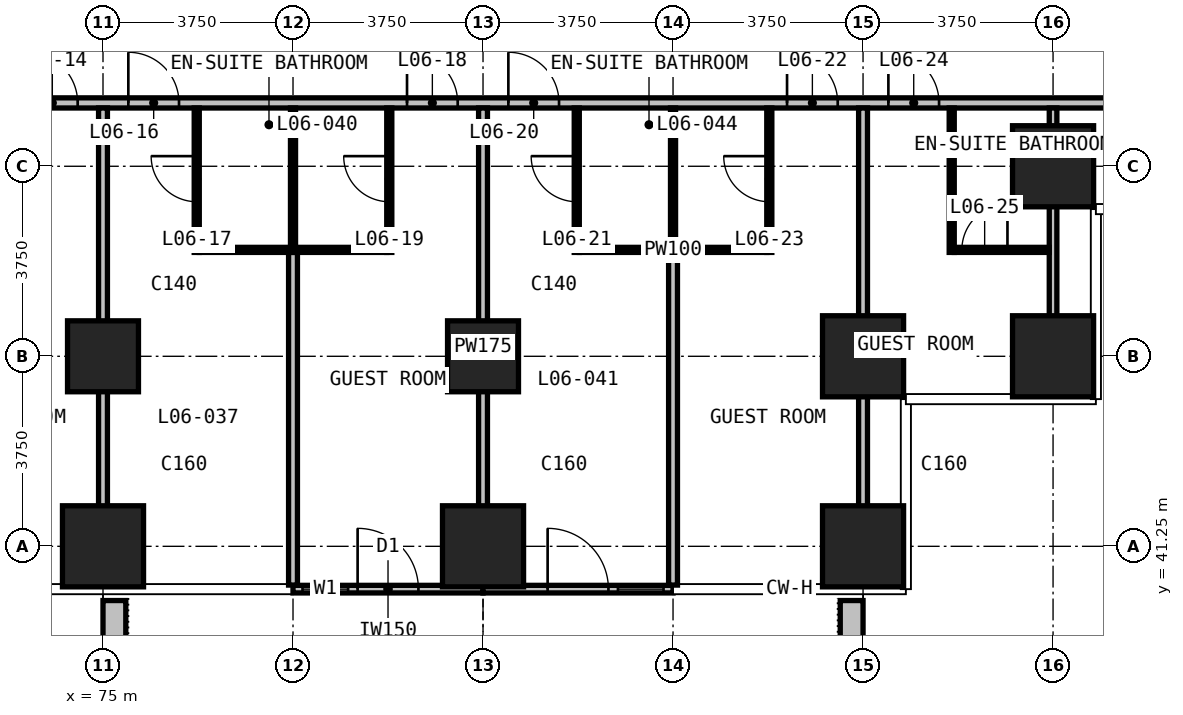
"""IFC4 building model, lengths in metres.
Left out: names, types, materials, properties, quantities, classifications, styles, units other than length and angle.
Written with IfcOpenShell. Run it as: python <this file> out.ifc"""

import sys

from ifc_helpers import new_model, si_unit, direction, frame, frame_2d, origin, origin_2d, place, context, subcontext, project, spatial, rectangle, extrude, element, fill, save


model = new_model("IFC4")
c1 = context("Model", 3, precision=1e-05, world=origin(), true_north=direction((0.0, 1.0)))
c2 = subcontext(c1, "Body", "Model", "MODEL_VIEW")
j1 = project(units=[si_unit("LENGTHUNIT", "METRE"), si_unit("PLANEANGLEUNIT", "RADIAN")], contexts=[c1])
p1 = place(None, origin())
s1 = spatial("IfcSite", under=j1, at=p1, CompositionType="ELEMENT")
p2 = place(p1, origin())
s2 = spatial("IfcBuilding", under=s1, at=p2, CompositionType="ELEMENT")
p3 = place(p2, frame((0.0, 0.0, 39.5)))
s3 = spatial("IfcBuildingStorey", under=s2, at=p3, CompositionType="ELEMENT", Elevation=39.5)
p4 = place(p3, frame((75.0, 41.25, 0.0), z_axis=(0.0, 0.0, 1.0), x_axis=(1.0, 0.0, 0.0)))
e1 = element("IfcColumn", 1, at=p4, inside=s3, PredefinedType="COLUMN", context=c2, shape_type="SweptSolid", body=[
    extrude(rectangle(XDim=1.6, YDim=1.6, at=origin_2d()), origin(), (0.0, 0.0, 1.0), 3.3),
])
p5 = place(p3, frame((75.0, 45.0, 0.0), z_axis=(0.0, 0.0, 1.0), x_axis=(1.0, 0.0, 0.0)))
e2 = element("IfcColumn", 2, at=p5, inside=s3, PredefinedType="COLUMN", context=c2, shape_type="SweptSolid", body=[
    extrude(rectangle(XDim=1.4, YDim=1.4, at=origin_2d()), origin(), (0.0, 0.0, 1.0), 3.3),
])
p6 = place(p3, frame((82.5, 41.25, 0.0), z_axis=(0.0, 0.0, 1.0), x_axis=(1.0, 0.0, 0.0)))
e3 = element("IfcColumn", 3, at=p6, inside=s3, PredefinedType="COLUMN", context=c2, shape_type="SweptSolid", body=[
    extrude(rectangle(XDim=1.6, YDim=1.6, at=origin_2d()), origin(), (0.0, 0.0, 1.0), 3.3),
])
p7 = place(p3, frame((82.5, 45.0, 0.0), z_axis=(0.0, 0.0, 1.0), x_axis=(1.0, 0.0, 0.0)))
e4 = element("IfcColumn", 4, at=p7, inside=s3, PredefinedType="COLUMN", context=c2, shape_type="SweptSolid", body=[
    extrude(rectangle(XDim=1.4, YDim=1.4, at=origin_2d()), origin(), (0.0, 0.0, 1.0), 3.3),
])
for number, where, z_axis, x_axis in (
    (5, (90.0, 41.25, 0.0), (0.0, 0.0, 1.0), (1.0, 0.0, 0.0)),
    (6, (90.0, 45.0, 0.0), (0.0, 0.0, 1.0), (1.0, 0.0, 0.0)),
    (7, (93.75, 45.0, 0.0), (0.0, 0.0, 1.0), (1.0, 0.0, 0.0)),
    (8, (93.75, 48.75, 0.0), (0.0, 0.0, 1.0), (1.0, 0.0, 0.0)),
):
    element("IfcColumn", number, at=place(p3, frame(where, z_axis=z_axis, x_axis=x_axis)), inside=s3, PredefinedType="COLUMN", context=c2, shape_type="SweptSolid", body=[
        extrude(rectangle(XDim=1.6, YDim=1.6, at=origin_2d()), origin(), (0.0, 0.0, 1.0), 3.3),
    ])
p8 = place(p3, frame((78.75, 40.405, 0.0), z_axis=(0.0, 0.0, 1.0), x_axis=(1.0, 0.0, 0.0)))
e9 = element("IfcWall", 9, at=p8, inside=s3, PredefinedType="SOLIDWALL", context=c2, shape_type="SweptSolid", body=[
    extrude(rectangle(XDim=3.75, YDim=0.15, at=frame_2d((1.875, 0.0))), origin(), (0.0, 0.0, 1.0), 3.0),
])
p9 = place(p8, frame((0.188, 0.0, 0.1)))
e10 = element("IfcOpeningElement", 10, at=p9, cuts=e9, PredefinedType="OPENING", context=c2, shape_type="SweptSolid", body=[
    extrude(rectangle(XDim=0.9, YDim=2.4, at=frame_2d((0.45, 1.2))), frame((0.0, 0.085, 0.0), z_axis=(0.0, -1.0, 0.0), x_axis=(1.0, 0.0, 0.0)), (0.0, 0.0, 1.0), 0.17),
])
p10 = place(p8, frame((1.275, 0.0, 0.0)))
e11 = element("IfcOpeningElement", 11, at=p10, cuts=e9, PredefinedType="OPENING", context=c2, shape_type="SweptSolid", body=[
    extrude(rectangle(XDim=1.2, YDim=2.4, at=frame_2d((0.6, 1.2))), frame((0.0, 0.085, 0.0), z_axis=(0.0, -1.0, 0.0), x_axis=(1.0, 0.0, 0.0)), (0.0, 0.0, 1.0), 0.17),
])
p11 = place(p3, frame((82.5, 40.405, 0.0), z_axis=(0.0, 0.0, 1.0), x_axis=(1.0, 0.0, 0.0)))
e12 = element("IfcWall", 12, at=p11, inside=s3, PredefinedType="SOLIDWALL", context=c2, shape_type="SweptSolid", body=[
    extrude(rectangle(XDim=3.75, YDim=0.15, at=frame_2d((1.875, 0.0))), origin(), (0.0, 0.0, 1.0), 3.0),
])
p12 = place(p11, frame((1.275, 0.0, 0.0)))
e13 = element("IfcOpeningElement", 13, at=p12, cuts=e12, PredefinedType="OPENING", context=c2, shape_type="SweptSolid", body=[
    extrude(rectangle(XDim=1.2, YDim=2.4, at=frame_2d((0.6, 1.2))), frame((0.0, 0.085, 0.0), z_axis=(0.0, -1.0, 0.0), x_axis=(1.0, 0.0, 0.0)), (0.0, 0.0, 1.0), 0.17),
])
p13 = place(p11, frame((2.663, 0.0, 0.1)))
e14 = element("IfcOpeningElement", 14, at=p13, cuts=e12, PredefinedType="OPENING", context=c2, shape_type="SweptSolid", body=[
    extrude(rectangle(XDim=0.9, YDim=2.4, at=frame_2d((0.45, 1.2))), frame((0.0, 0.085, 0.0), z_axis=(0.0, -1.0, 0.0), x_axis=(1.0, 0.0, 0.0)), (0.0, 0.0, 1.0), 0.17),
])
for number, where, z_axis, x_axis in (
    (15, (75.225, 40.18, 0.0), (0.0, 0.0, 1.0), (0.0, -1.0, 0.0)),
    (16, (89.775, 40.18, 0.0), (0.0, 0.0, 1.0), (0.0, -1.0, 0.0)),
):
    element("IfcWall", number, at=place(p3, frame(where, z_axis=z_axis, x_axis=x_axis)), inside=s3, PredefinedType="USERDEFINED", context=c2, shape_type="SweptSolid", body=[
        extrude(rectangle(XDim=2.33, YDim=0.45, at=frame_2d((1.165, 0.0))), origin(), (0.0, 0.0, 1.0), 1.1),
    ])
p14 = place(p3, frame((52.575, 50.0, 0.0), z_axis=(0.0, 0.0, 1.0), x_axis=(1.0, 0.0, 0.0)))
e17 = element("IfcWall", 17, at=p14, inside=s3, PredefinedType="PARTITIONING", context=c2, shape_type="SweptSolid", body=[
    extrude(rectangle(XDim=44.85, YDim=0.2, at=frame_2d((22.425, 0.0))), origin(), (0.0, 0.0, 1.0), 3.0),
])
p15 = place(p14, frame((5.925, 0.0, 0.0)))
e18 = element("IfcOpeningElement", 18, at=p15, cuts=e17, PredefinedType="OPENING", context=c2, shape_type="SweptSolid", body=[
    extrude(rectangle(XDim=1.0, YDim=2.2, at=frame_2d((0.5, 1.1))), frame((0.0, 0.11, 0.0), z_axis=(0.0, -1.0, 0.0), x_axis=(1.0, 0.0, 0.0)), (0.0, 0.0, 1.0), 0.22),
])
p16 = place(p14, frame((7.925, 0.0, 0.0)))
e19 = element("IfcOpeningElement", 19, at=p16, cuts=e17, PredefinedType="OPENING", context=c2, shape_type="SweptSolid", body=[
    extrude(rectangle(XDim=1.0, YDim=2.2, at=frame_2d((0.5, 1.1))), frame((0.0, 0.11, 0.0), z_axis=(0.0, -1.0, 0.0), x_axis=(1.0, 0.0, 0.0)), (0.0, 0.0, 1.0), 0.22),
])
p17 = place(p14, frame((13.425, 0.0, 0.0)))
e20 = element("IfcOpeningElement", 20, at=p17, cuts=e17, PredefinedType="OPENING", context=c2, shape_type="SweptSolid", body=[
    extrude(rectangle(XDim=1.0, YDim=2.2, at=frame_2d((0.5, 1.1))), frame((0.0, 0.11, 0.0), z_axis=(0.0, -1.0, 0.0), x_axis=(1.0, 0.0, 0.0)), (0.0, 0.0, 1.0), 0.22),
])
p18 = place(p14, frame((15.425, 0.0, 0.0)))
e21 = element("IfcOpeningElement", 21, at=p18, cuts=e17, PredefinedType="OPENING", context=c2, shape_type="SweptSolid", body=[
    extrude(rectangle(XDim=1.0, YDim=2.2, at=frame_2d((0.5, 1.1))), frame((0.0, 0.11, 0.0), z_axis=(0.0, -1.0, 0.0), x_axis=(1.0, 0.0, 0.0)), (0.0, 0.0, 1.0), 0.22),
])
p19 = place(p14, frame((20.925, 0.0, 0.0)))
e22 = element("IfcOpeningElement", 22, at=p19, cuts=e17, PredefinedType="OPENING", context=c2, shape_type="SweptSolid", body=[
    extrude(rectangle(XDim=1.0, YDim=2.2, at=frame_2d((0.5, 1.1))), frame((0.0, 0.11, 0.0), z_axis=(0.0, -1.0, 0.0), x_axis=(1.0, 0.0, 0.0)), (0.0, 0.0, 1.0), 0.22),
])
p20 = place(p14, frame((22.925, 0.0, 0.0)))
e23 = element("IfcOpeningElement", 23, at=p20, cuts=e17, PredefinedType="OPENING", context=c2, shape_type="SweptSolid", body=[
    extrude(rectangle(XDim=1.0, YDim=2.2, at=frame_2d((0.5, 1.1))), frame((0.0, 0.11, 0.0), z_axis=(0.0, -1.0, 0.0), x_axis=(1.0, 0.0, 0.0)), (0.0, 0.0, 1.0), 0.22),
])
p21 = place(p14, frame((28.425, 0.0, 0.0)))
e24 = element("IfcOpeningElement", 24, at=p21, cuts=e17, PredefinedType="OPENING", context=c2, shape_type="SweptSolid", body=[
    extrude(rectangle(XDim=1.0, YDim=2.2, at=frame_2d((0.5, 1.1))), frame((0.0, 0.11, 0.0), z_axis=(0.0, -1.0, 0.0), x_axis=(1.0, 0.0, 0.0)), (0.0, 0.0, 1.0), 0.22),
])
p22 = place(p14, frame((30.425, 0.0, 0.0)))
e25 = element("IfcOpeningElement", 25, at=p22, cuts=e17, PredefinedType="OPENING", context=c2, shape_type="SweptSolid", body=[
    extrude(rectangle(XDim=1.0, YDim=2.2, at=frame_2d((0.5, 1.1))), frame((0.0, 0.11, 0.0), z_axis=(0.0, -1.0, 0.0), x_axis=(1.0, 0.0, 0.0)), (0.0, 0.0, 1.0), 0.22),
])
p23 = place(p14, frame((35.925, 0.0, 0.0)))
e26 = element("IfcOpeningElement", 26, at=p23, cuts=e17, PredefinedType="OPENING", context=c2, shape_type="SweptSolid", body=[
    extrude(rectangle(XDim=1.0, YDim=2.2, at=frame_2d((0.5, 1.1))), frame((0.0, 0.11, 0.0), z_axis=(0.0, -1.0, 0.0), x_axis=(1.0, 0.0, 0.0)), (0.0, 0.0, 1.0), 0.22),
])
p24 = place(p14, frame((37.925, 0.0, 0.0)))
e27 = element("IfcOpeningElement", 27, at=p24, cuts=e17, PredefinedType="OPENING", context=c2, shape_type="SweptSolid", body=[
    extrude(rectangle(XDim=1.0, YDim=2.2, at=frame_2d((0.5, 1.1))), frame((0.0, 0.11, 0.0), z_axis=(0.0, -1.0, 0.0), x_axis=(1.0, 0.0, 0.0)), (0.0, 0.0, 1.0), 0.22),
])
p25 = place(p14, frame((1.4, 0.0, 0.0)))
e28 = element("IfcOpeningElement", 28, at=p25, cuts=e17, PredefinedType="OPENING", context=c2, shape_type="SweptSolid", body=[
    extrude(rectangle(XDim=0.9, YDim=2.2, at=frame_2d((0.45, 1.1))), frame((0.0, 0.11, 0.0), z_axis=(0.0, -1.0, 0.0), x_axis=(1.0, 0.0, 0.0)), (0.0, 0.0, 1.0), 0.22),
])
p26 = place(p14, frame((42.575, 0.0, 0.0)))
e29 = element("IfcOpeningElement", 29, at=p26, cuts=e17, PredefinedType="OPENING", context=c2, shape_type="SweptSolid", body=[
    extrude(rectangle(XDim=0.9, YDim=2.2, at=frame_2d((0.45, 1.1))), frame((0.0, 0.11, 0.0), z_axis=(0.0, -1.0, 0.0), x_axis=(1.0, 0.0, 0.0)), (0.0, 0.0, 1.0), 0.22),
])
p27 = place(p3, frame((75.0, 40.485, 0.0), z_axis=(0.0, 0.0, 1.0), x_axis=(0.0, 1.0, 0.0)))
e30 = element("IfcWall", 30, at=p27, inside=s3, PredefinedType="PARTITIONING", context=c2, shape_type="SweptSolid", body=[
    extrude(rectangle(XDim=9.415, YDim=0.175, at=frame_2d((4.708, 0.0))), origin(), (0.0, 0.0, 1.0), 3.0),
])
p28 = place(p3, frame((78.75, 40.485, 0.0), z_axis=(0.0, 0.0, 1.0), x_axis=(0.0, 1.0, 0.0)))
e31 = element("IfcWall", 31, at=p28, inside=s3, PredefinedType="PARTITIONING", context=c2, shape_type="SweptSolid", body=[
    extrude(rectangle(XDim=6.565, YDim=0.175, at=frame_2d((3.282, 0.0))), origin(), (0.0, 0.0, 1.0), 3.0),
])
p29 = place(p3, frame((82.5, 40.485, 0.0), z_axis=(0.0, 0.0, 1.0), x_axis=(0.0, 1.0, 0.0)))
e32 = element("IfcWall", 32, at=p29, inside=s3, PredefinedType="PARTITIONING", context=c2, shape_type="SweptSolid", body=[
    extrude(rectangle(XDim=9.415, YDim=0.175, at=frame_2d((4.708, 0.0))), origin(), (0.0, 0.0, 1.0), 3.0),
])
p30 = place(p3, frame((86.25, 40.485, 0.0), z_axis=(0.0, 0.0, 1.0), x_axis=(0.0, 1.0, 0.0)))
e33 = element("IfcWall", 33, at=p30, inside=s3, PredefinedType="PARTITIONING", context=c2, shape_type="SweptSolid", body=[
    extrude(rectangle(XDim=6.565, YDim=0.175, at=frame_2d((3.282, 0.0))), origin(), (0.0, 0.0, 1.0), 3.0),
])
p31 = place(p3, frame((90.0, 40.485, 0.0), z_axis=(0.0, 0.0, 1.0), x_axis=(0.0, 1.0, 0.0)))
e34 = element("IfcWall", 34, at=p31, inside=s3, PredefinedType="PARTITIONING", context=c2, shape_type="SweptSolid", body=[
    extrude(rectangle(XDim=9.415, YDim=0.175, at=frame_2d((4.708, 0.0))), origin(), (0.0, 0.0, 1.0), 3.0),
])
p32 = place(p3, frame((93.75, 44.235, 0.0), z_axis=(0.0, 0.0, 1.0), x_axis=(0.0, 1.0, 0.0)))
e35 = element("IfcWall", 35, at=p32, inside=s3, PredefinedType="PARTITIONING", context=c2, shape_type="SweptSolid", body=[
    extrude(rectangle(XDim=5.665, YDim=0.15, at=frame_2d((2.833, 0.0))), origin(), (0.0, 0.0, 1.0), 3.0),
])
for number, where, z_axis, x_axis in (
    (36, (76.9, 47.1, 0.0), (0.0, 0.0, 1.0), (1.0, 0.0, 0.0)),
    (37, (84.4, 47.1, 0.0), (0.0, 0.0, 1.0), (1.0, 0.0, 0.0)),
):
    element("IfcWall", number, at=place(p3, frame(where, z_axis=z_axis, x_axis=x_axis)), inside=s3, PredefinedType="PARTITIONING", context=c2, shape_type="SweptSolid", body=[
        extrude(rectangle(XDim=3.7, YDim=0.1, at=frame_2d((1.85, 0.0))), origin(), (0.0, 0.0, 1.0), 3.0),
    ])
p33 = place(p3, frame((91.8, 47.1, 0.0), z_axis=(0.0, 0.0, 1.0), x_axis=(1.0, 0.0, 0.0)))
e38 = element("IfcWall", 38, at=p33, inside=s3, PredefinedType="PARTITIONING", context=c2, shape_type="SweptSolid", body=[
    extrude(rectangle(XDim=1.875, YDim=0.1, at=frame_2d((0.938, 0.0))), origin(), (0.0, 0.0, 1.0), 3.0),
])
p34 = place(p33, frame((0.15, 0.0, 0.0)))
e39 = element("IfcOpeningElement", 39, at=p34, cuts=e38, PredefinedType="OPENING", context=c2, shape_type="SweptSolid", body=[
    extrude(rectangle(XDim=0.9, YDim=2.2, at=frame_2d((0.45, 1.1))), frame((0.0, 0.06, 0.0), z_axis=(0.0, -1.0, 0.0), x_axis=(1.0, 0.0, 0.0)), (0.0, 0.0, 1.0), 0.12),
])
p35 = place(p3, frame((76.85, 47.05, 0.0), z_axis=(0.0, 0.0, 1.0), x_axis=(0.0, 1.0, 0.0)))
e40 = element("IfcWall", 40, at=p35, inside=s3, PredefinedType="PARTITIONING", context=c2, shape_type="SweptSolid", body=[
    extrude(rectangle(XDim=2.85, YDim=0.1, at=frame_2d((1.425, 0.0))), origin(), (0.0, 0.0, 1.0), 3.0),
])
p36 = place(p35, frame((1.0, 0.0, 0.0)))
e41 = element("IfcOpeningElement", 41, at=p36, cuts=e40, PredefinedType="OPENING", context=c2, shape_type="SweptSolid", body=[
    extrude(rectangle(XDim=0.9, YDim=2.2, at=frame_2d((0.45, 1.1))), frame((0.0, 0.06, 0.0), z_axis=(0.0, -1.0, 0.0), x_axis=(1.0, 0.0, 0.0)), (0.0, 0.0, 1.0), 0.12),
])
p37 = place(p3, frame((78.75, 47.15, 0.0), z_axis=(0.0, 0.0, 1.0), x_axis=(0.0, 1.0, 0.0)))
e42 = element("IfcWall", 42, at=p37, inside=s3, PredefinedType="PARTITIONING", context=c2, shape_type="SweptSolid", body=[
    extrude(rectangle(XDim=2.75, YDim=0.1, at=frame_2d((1.375, 0.0))), origin(), (0.0, 0.0, 1.0), 3.0),
])
p38 = place(p3, frame((80.65, 47.05, 0.0), z_axis=(0.0, 0.0, 1.0), x_axis=(0.0, 1.0, 0.0)))
e43 = element("IfcWall", 43, at=p38, inside=s3, PredefinedType="PARTITIONING", context=c2, shape_type="SweptSolid", body=[
    extrude(rectangle(XDim=2.85, YDim=0.1, at=frame_2d((1.425, 0.0))), origin(), (0.0, 0.0, 1.0), 3.0),
])
p39 = place(p38, frame((1.0, 0.0, 0.0)))
e44 = element("IfcOpeningElement", 44, at=p39, cuts=e43, PredefinedType="OPENING", context=c2, shape_type="SweptSolid", body=[
    extrude(rectangle(XDim=0.9, YDim=2.2, at=frame_2d((0.45, 1.1))), frame((0.0, 0.06, 0.0), z_axis=(0.0, -1.0, 0.0), x_axis=(1.0, 0.0, 0.0)), (0.0, 0.0, 1.0), 0.12),
])
p40 = place(p3, frame((84.35, 47.05, 0.0), z_axis=(0.0, 0.0, 1.0), x_axis=(0.0, 1.0, 0.0)))
e45 = element("IfcWall", 45, at=p40, inside=s3, PredefinedType="PARTITIONING", context=c2, shape_type="SweptSolid", body=[
    extrude(rectangle(XDim=2.85, YDim=0.1, at=frame_2d((1.425, 0.0))), origin(), (0.0, 0.0, 1.0), 3.0),
])
p41 = place(p40, frame((1.0, 0.0, 0.0)))
e46 = element("IfcOpeningElement", 46, at=p41, cuts=e45, PredefinedType="OPENING", context=c2, shape_type="SweptSolid", body=[
    extrude(rectangle(XDim=0.9, YDim=2.2, at=frame_2d((0.45, 1.1))), frame((0.0, 0.06, 0.0), z_axis=(0.0, -1.0, 0.0), x_axis=(1.0, 0.0, 0.0)), (0.0, 0.0, 1.0), 0.12),
])
p42 = place(p3, frame((86.25, 47.15, 0.0), z_axis=(0.0, 0.0, 1.0), x_axis=(0.0, 1.0, 0.0)))
e47 = element("IfcWall", 47, at=p42, inside=s3, PredefinedType="PARTITIONING", context=c2, shape_type="SweptSolid", body=[
    extrude(rectangle(XDim=2.75, YDim=0.1, at=frame_2d((1.375, 0.0))), origin(), (0.0, 0.0, 1.0), 3.0),
])
p43 = place(p3, frame((88.15, 47.05, 0.0), z_axis=(0.0, 0.0, 1.0), x_axis=(0.0, 1.0, 0.0)))
e48 = element("IfcWall", 48, at=p43, inside=s3, PredefinedType="PARTITIONING", context=c2, shape_type="SweptSolid", body=[
    extrude(rectangle(XDim=2.85, YDim=0.1, at=frame_2d((1.425, 0.0))), origin(), (0.0, 0.0, 1.0), 3.0),
])
p44 = place(p43, frame((1.0, 0.0, 0.0)))
e49 = element("IfcOpeningElement", 49, at=p44, cuts=e48, PredefinedType="OPENING", context=c2, shape_type="SweptSolid", body=[
    extrude(rectangle(XDim=0.9, YDim=2.2, at=frame_2d((0.45, 1.1))), frame((0.0, 0.06, 0.0), z_axis=(0.0, -1.0, 0.0), x_axis=(1.0, 0.0, 0.0)), (0.0, 0.0, 1.0), 0.12),
])
p45 = place(p3, frame((91.75, 47.05, 0.0), z_axis=(0.0, 0.0, 1.0), x_axis=(0.0, 1.0, 0.0)))
e50 = element("IfcWall", 50, at=p45, inside=s3, PredefinedType="PARTITIONING", context=c2, shape_type="SweptSolid", body=[
    extrude(rectangle(XDim=2.85, YDim=0.1, at=frame_2d((1.425, 0.0))), origin(), (0.0, 0.0, 1.0), 3.0),
])
p46 = place(p9, origin())
e51 = element("IfcWindow", 51, at=p46, inside=s3, PartitioningType="SINGLE_PANEL", PredefinedType="WINDOW", context=c2, shape_type="SweptSolid", body=[
    extrude(rectangle(XDim=0.9, YDim=2.4, at=frame_2d((0.45, 1.2))), frame((0.0, 0.03, 0.0), z_axis=(0.0, -1.0, 0.0), x_axis=(1.0, 0.0, 0.0)), (0.0, 0.0, 1.0), 0.06),
])
fill(e10, e51)
p47 = place(p10, origin())
e52 = element("IfcDoor", 52, at=p47, inside=s3, OperationType="SINGLE_SWING_LEFT", PredefinedType="DOOR", context=c2, shape_type="SweptSolid", body=[
    extrude(rectangle(XDim=1.2, YDim=2.4, at=frame_2d((0.6, 1.2))), frame((0.0, 0.025, 0.0), z_axis=(0.0, -1.0, 0.0), x_axis=(1.0, 0.0, 0.0)), (0.0, 0.0, 1.0), 0.05),
])
fill(e11, e52)
p48 = place(p12, origin())
e53 = element("IfcDoor", 53, at=p48, inside=s3, OperationType="SINGLE_SWING_LEFT", PredefinedType="DOOR", context=c2, shape_type="SweptSolid", body=[
    extrude(rectangle(XDim=1.2, YDim=2.4, at=frame_2d((0.6, 1.2))), frame((0.0, 0.025, 0.0), z_axis=(0.0, -1.0, 0.0), x_axis=(1.0, 0.0, 0.0)), (0.0, 0.0, 1.0), 0.05),
])
fill(e13, e53)
p49 = place(p13, origin())
e54 = element("IfcWindow", 54, at=p49, inside=s3, PartitioningType="SINGLE_PANEL", PredefinedType="WINDOW", context=c2, shape_type="SweptSolid", body=[
    extrude(rectangle(XDim=0.9, YDim=2.4, at=frame_2d((0.45, 1.2))), frame((0.0, 0.03, 0.0), z_axis=(0.0, -1.0, 0.0), x_axis=(1.0, 0.0, 0.0)), (0.0, 0.0, 1.0), 0.06),
])
fill(e14, e54)
p50 = place(p19, origin())
e55 = element("IfcDoor", 55, at=p50, inside=s3, OperationType="SINGLE_SWING_LEFT", PredefinedType="DOOR", context=c2, shape_type="SweptSolid", body=[
    extrude(rectangle(XDim=1.0, YDim=2.2, at=frame_2d((0.5, 1.1))), frame((0.0, 0.025, 0.0), z_axis=(0.0, -1.0, 0.0), x_axis=(1.0, 0.0, 0.0)), (0.0, 0.0, 1.0), 0.05),
])
fill(e22, e55)
p51 = place(p20, origin())
e56 = element("IfcDoor", 56, at=p51, inside=s3, OperationType="SINGLE_SWING_RIGHT", PredefinedType="DOOR", context=c2, shape_type="SweptSolid", body=[
    extrude(rectangle(XDim=1.0, YDim=2.2, at=frame_2d((0.5, 1.1))), frame((0.0, 0.025, 0.0), z_axis=(0.0, -1.0, 0.0), x_axis=(1.0, 0.0, 0.0)), (0.0, 0.0, 1.0), 0.05),
])
fill(e23, e56)
p52 = place(p36, origin())
e57 = element("IfcDoor", 57, at=p52, inside=s3, OperationType="SINGLE_SWING_RIGHT", PredefinedType="DOOR", context=c2, shape_type="SweptSolid", body=[
    extrude(rectangle(XDim=0.9, YDim=2.2, at=frame_2d((0.45, 1.1))), frame((0.0, 0.025, 0.0), z_axis=(0.0, -1.0, 0.0), x_axis=(1.0, 0.0, 0.0)), (0.0, 0.0, 1.0), 0.05),
])
fill(e41, e57)
p53 = place(p21, origin())
e58 = element("IfcDoor", 58, at=p53, inside=s3, OperationType="SINGLE_SWING_RIGHT", PredefinedType="DOOR", context=c2, shape_type="SweptSolid", body=[
    extrude(rectangle(XDim=1.0, YDim=2.2, at=frame_2d((0.5, 1.1))), frame((0.0, 0.025, 0.0), z_axis=(0.0, -1.0, 0.0), x_axis=(1.0, 0.0, 0.0)), (0.0, 0.0, 1.0), 0.05),
])
fill(e24, e58)
p54 = place(p39, origin())
e59 = element("IfcDoor", 59, at=p54, inside=s3, OperationType="SINGLE_SWING_RIGHT", PredefinedType="DOOR", context=c2, shape_type="SweptSolid", body=[
    extrude(rectangle(XDim=0.9, YDim=2.2, at=frame_2d((0.45, 1.1))), frame((0.0, 0.025, 0.0), z_axis=(0.0, -1.0, 0.0), x_axis=(1.0, 0.0, 0.0)), (0.0, 0.0, 1.0), 0.05),
])
fill(e44, e59)
p55 = place(p22, origin())
e60 = element("IfcDoor", 60, at=p55, inside=s3, OperationType="SINGLE_SWING_LEFT", PredefinedType="DOOR", context=c2, shape_type="SweptSolid", body=[
    extrude(rectangle(XDim=1.0, YDim=2.2, at=frame_2d((0.5, 1.1))), frame((0.0, 0.025, 0.0), z_axis=(0.0, -1.0, 0.0), x_axis=(1.0, 0.0, 0.0)), (0.0, 0.0, 1.0), 0.05),
])
fill(e25, e60)
p56 = place(p41, origin())
e61 = element("IfcDoor", 61, at=p56, inside=s3, OperationType="SINGLE_SWING_RIGHT", PredefinedType="DOOR", context=c2, shape_type="SweptSolid", body=[
    extrude(rectangle(XDim=0.9, YDim=2.2, at=frame_2d((0.45, 1.1))), frame((0.0, 0.025, 0.0), z_axis=(0.0, -1.0, 0.0), x_axis=(1.0, 0.0, 0.0)), (0.0, 0.0, 1.0), 0.05),
])
fill(e46, e61)
p57 = place(p23, origin())
e62 = element("IfcDoor", 62, at=p57, inside=s3, OperationType="SINGLE_SWING_LEFT", PredefinedType="DOOR", context=c2, shape_type="SweptSolid", body=[
    extrude(rectangle(XDim=1.0, YDim=2.2, at=frame_2d((0.5, 1.1))), frame((0.0, 0.025, 0.0), z_axis=(0.0, -1.0, 0.0), x_axis=(1.0, 0.0, 0.0)), (0.0, 0.0, 1.0), 0.05),
])
fill(e26, e62)
p58 = place(p44, origin())
e63 = element("IfcDoor", 63, at=p58, inside=s3, OperationType="SINGLE_SWING_RIGHT", PredefinedType="DOOR", context=c2, shape_type="SweptSolid", body=[
    extrude(rectangle(XDim=0.9, YDim=2.2, at=frame_2d((0.45, 1.1))), frame((0.0, 0.025, 0.0), z_axis=(0.0, -1.0, 0.0), x_axis=(1.0, 0.0, 0.0)), (0.0, 0.0, 1.0), 0.05),
])
fill(e49, e63)
p59 = place(p24, origin())
e64 = element("IfcDoor", 64, at=p59, inside=s3, OperationType="SINGLE_SWING_RIGHT", PredefinedType="DOOR", context=c2, shape_type="SweptSolid", body=[
    extrude(rectangle(XDim=1.0, YDim=2.2, at=frame_2d((0.5, 1.1))), frame((0.0, 0.025, 0.0), z_axis=(0.0, -1.0, 0.0), x_axis=(1.0, 0.0, 0.0)), (0.0, 0.0, 1.0), 0.05),
])
fill(e27, e64)
p60 = place(p34, origin())
e65 = element("IfcDoor", 65, at=p60, inside=s3, OperationType="SINGLE_SWING_RIGHT", PredefinedType="DOOR", context=c2, shape_type="SweptSolid", body=[
    extrude(rectangle(XDim=0.9, YDim=2.2, at=frame_2d((0.45, 1.1))), frame((0.0, 0.025, 0.0), z_axis=(0.0, -1.0, 0.0), x_axis=(1.0, 0.0, 0.0)), (0.0, 0.0, 1.0), 0.05),
])
fill(e39, e65)
save(model, sys.argv[1])
